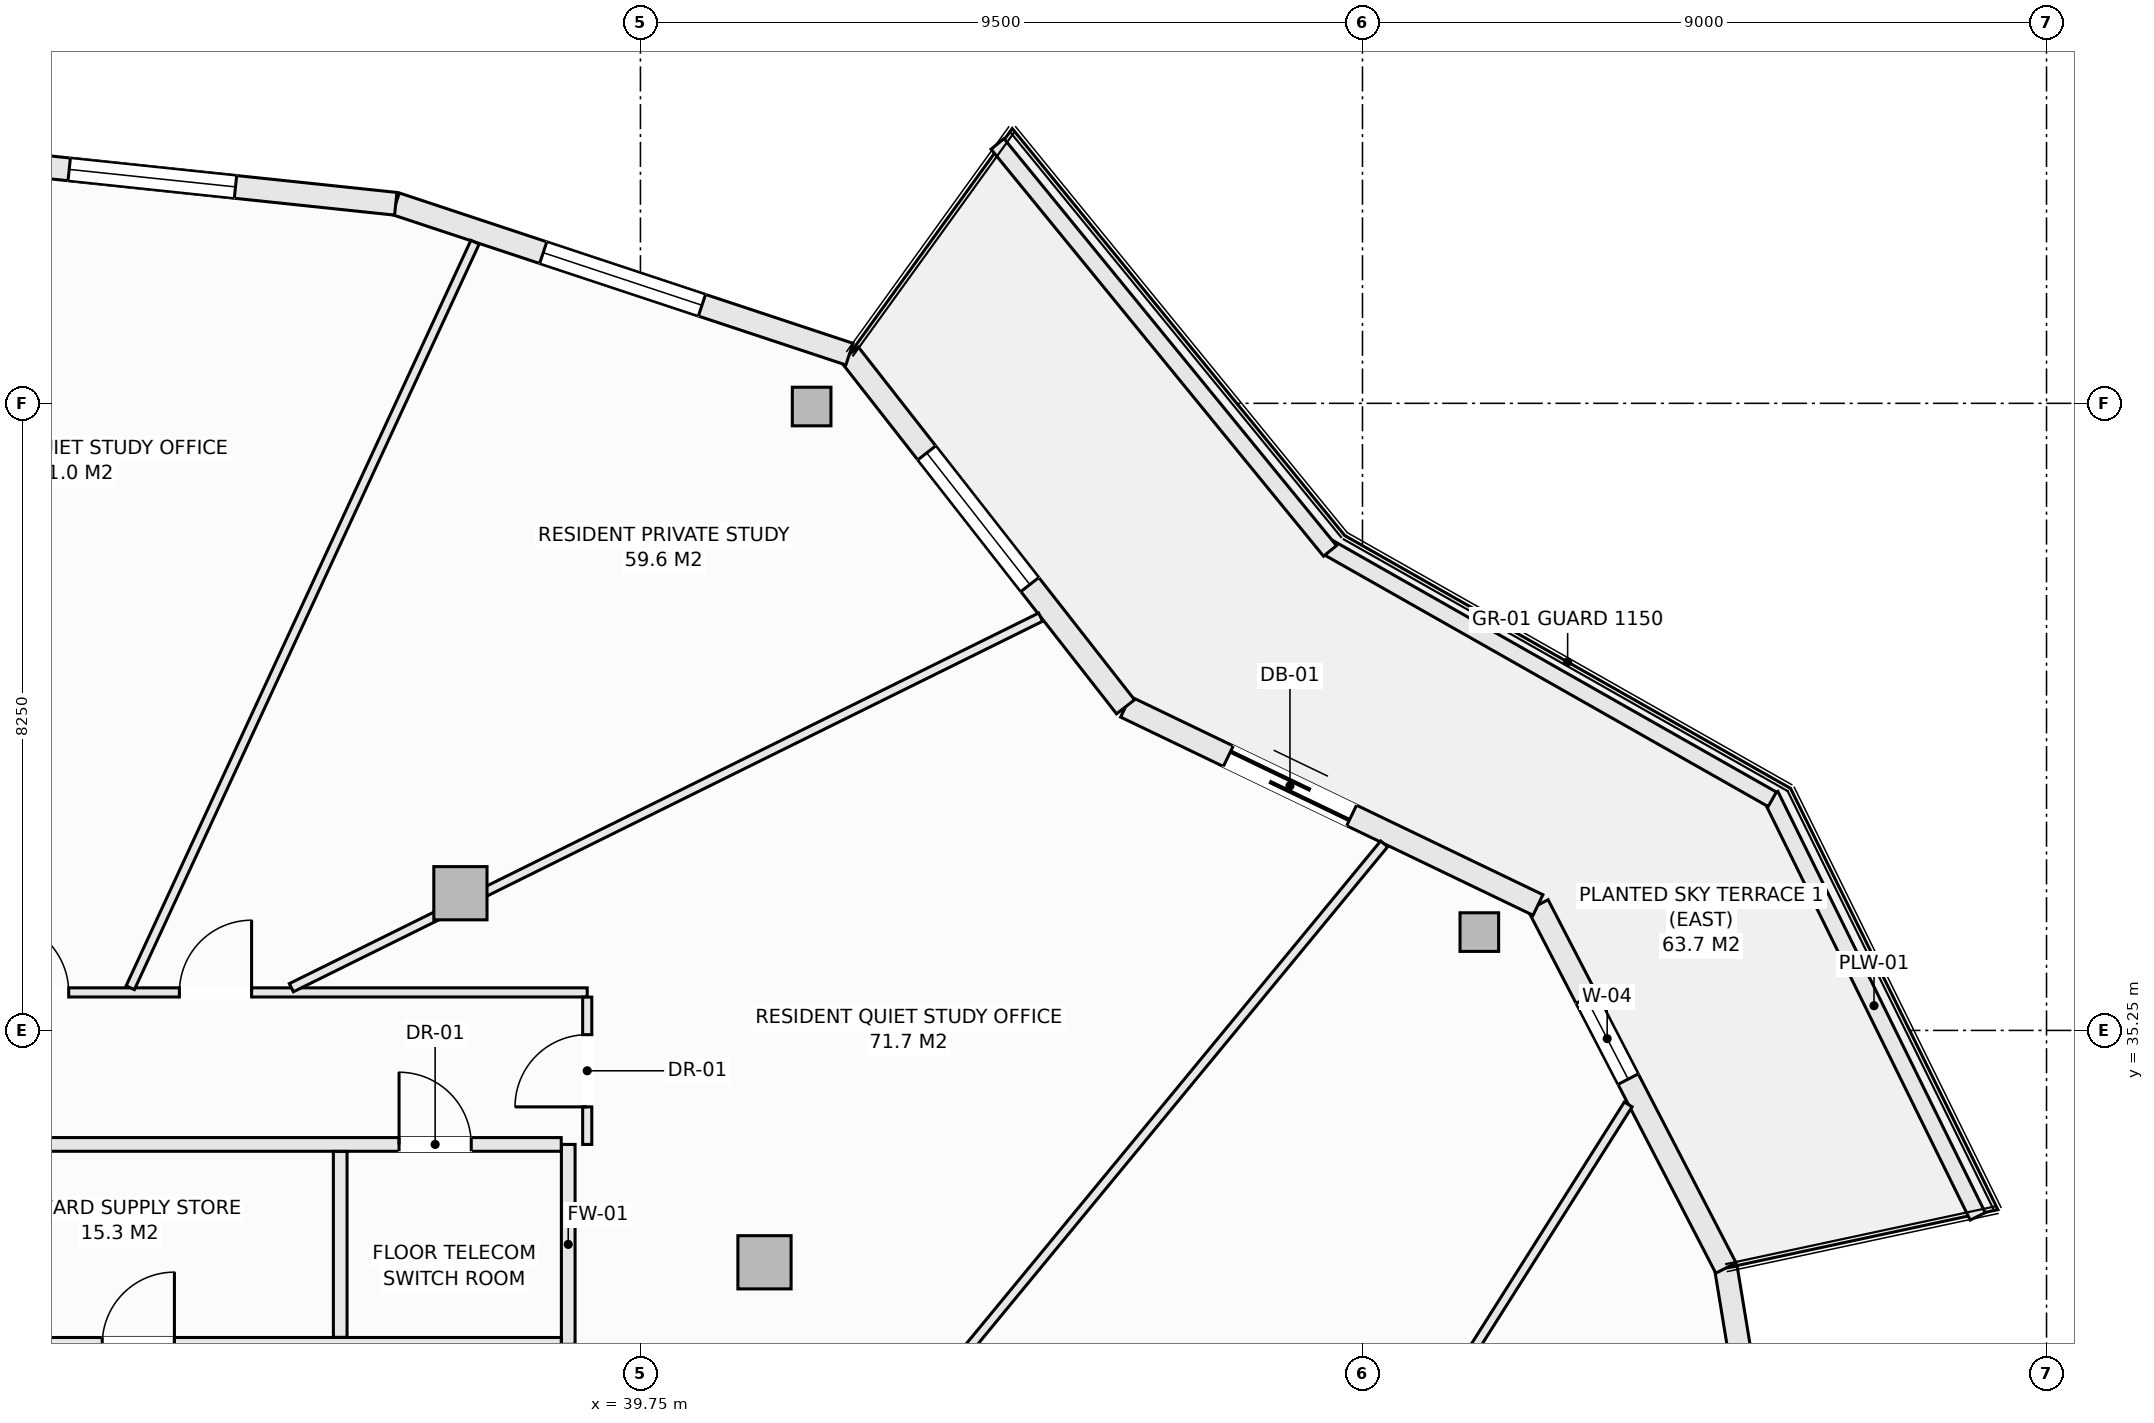
"""IFC4 building model, lengths in metres.
Left out: names, types, materials, properties, quantities, classifications, styles, units other than length and angle.
Written with IfcOpenShell. Run it as: python <this file> out.ifc"""

import sys

from ifc_helpers import new_model, si_unit, direction, frame, frame_2d, origin, origin_2d, place, context, subcontext, project, spatial, rectangle, hollow_rectangle, extrude, element, fill, save


model = new_model("IFC4")
c1 = context("Model", 3, precision=1e-05, world=origin(), true_north=direction((0.0, 1.0)))
c2 = subcontext(c1, "Body", "Model", "MODEL_VIEW")
j1 = project(units=[si_unit("LENGTHUNIT", "METRE"), si_unit("PLANEANGLEUNIT", "RADIAN")], contexts=[c1])
p1 = place(None, origin())
s1 = spatial("IfcSite", under=j1, at=p1, CompositionType="ELEMENT")
p2 = place(p1, origin())
s2 = spatial("IfcBuilding", under=s1, at=p2, CompositionType="ELEMENT")
p3 = place(p2, frame((0.0, 0.0, 203.0)))
s3 = spatial("IfcBuildingStorey", under=s2, at=p3, CompositionType="ELEMENT", Elevation=203.0)
for number, where, z_axis, x_axis in (
    (1, (50.787, 36.544, -0.27), (0.0, 0.0, 1.0), (1.0, 0.0, 0.0)),
    (2, (42.003, 43.458, -0.27), (0.0, 0.0, 1.0), (1.0, 0.0, 0.0)),
):
    element("IfcColumn", number, at=place(p3, frame(where, z_axis=z_axis, x_axis=x_axis)), inside=s3, PredefinedType="COLUMN", context=c2, shape_type="SweptSolid", body=[
        extrude(hollow_rectangle(XDim=0.508, YDim=0.508, WallThickness=0.019, at=origin_2d()), origin(), (0.0, 0.0, 1.0), 3.3),
    ])
for number, where, z_axis, x_axis in (
    (3, (41.382, 32.199, -0.27), (0.0, 0.0, 1.0), (1.0, 0.0, 0.0)),
    (4, (37.382, 37.055, -0.27), (0.0, 0.0, 1.0), (1.0, 0.0, 0.0)),
):
    element("IfcColumn", number, at=place(p3, frame(where, z_axis=z_axis, x_axis=x_axis)), inside=s3, PredefinedType="COLUMN", context=c2, shape_type="SweptSolid", body=[
        extrude(rectangle(XDim=0.7, YDim=0.7, at=origin_2d()), origin(), (0.0, 0.0, 1.0), 3.3),
    ])
p4 = place(p3, frame((54.032, 32.125, 0.0), z_axis=(0.0, 0.0, 1.0), x_axis=(0.16237087798, -0.986729799886, 0.0)))
e5 = element("IfcWall", 5, at=p4, inside=s3, PredefinedType="SOLIDWALL", context=c2, shape_type="SweptSolid", body=[
    extrude(rectangle(XDim=5.193, YDim=0.3, at=frame_2d((2.597, 0.0))), origin(), (0.0, 0.0, 1.0), 2.605),
])
p5 = place(p4, frame((1.497, 0.0, 0.72)))
e6 = element("IfcOpeningElement", 6, at=p5, cuts=e5, PredefinedType="OPENING", context=c2, shape_type="SweptSolid", body=[
    extrude(rectangle(XDim=2.2, YDim=1.65, at=frame_2d((1.1, 0.825))), frame((0.0, 0.16, 0.0), z_axis=(0.0, -1.0, 0.0), x_axis=(1.0, 0.0, 0.0)), (0.0, 0.0, 1.0), 0.32),
])
p6 = place(p3, frame((51.559, 36.9, 0.0), z_axis=(0.0, 0.0, 1.0), x_axis=(0.459808219482, -0.888018243786, 0.0)))
e7 = element("IfcWall", 7, at=p6, inside=s3, PredefinedType="SOLIDWALL", context=c2, shape_type="SweptSolid", body=[
    extrude(rectangle(XDim=5.378, YDim=0.3, at=frame_2d((2.689, 0.0))), origin(), (0.0, 0.0, 1.0), 2.605),
])
p7 = place(p6, frame((1.38, 0.0, 0.72)))
e8 = element("IfcOpeningElement", 8, at=p7, cuts=e7, PredefinedType="OPENING", context=c2, shape_type="SweptSolid", body=[
    extrude(rectangle(XDim=1.2, YDim=1.65, at=frame_2d((0.6, 0.825))), frame((0.0, 0.16, 0.0), z_axis=(0.0, -1.0, 0.0), x_axis=(1.0, 0.0, 0.0)), (0.0, 0.0, 1.0), 0.32),
])
p8 = place(p3, frame((46.133, 39.507, 0.0), z_axis=(0.0, 0.0, 1.0), x_axis=(0.901348331142, -0.433094892545, 0.0)))
e9 = element("IfcWall", 9, at=p8, inside=s3, PredefinedType="SOLIDWALL", context=c2, shape_type="SweptSolid", body=[
    extrude(rectangle(XDim=6.021, YDim=0.3, at=frame_2d((3.01, 0.0))), origin(), (0.0, 0.0, 1.0), 2.605),
])
p9 = place(p8, frame((1.5, 0.0, 0.0)))
e10 = element("IfcOpeningElement", 10, at=p9, cuts=e9, PredefinedType="OPENING", context=c2, shape_type="SweptSolid", body=[
    extrude(rectangle(XDim=1.8, YDim=2.25, at=frame_2d((0.9, 1.125))), frame((0.0, 0.16, 0.0), z_axis=(0.0, -1.0, 0.0), x_axis=(1.0, 0.0, 0.0)), (0.0, 0.0, 1.0), 0.32),
])
p10 = place(p3, frame((42.5, 44.147, 0.0), z_axis=(0.0, 0.0, 1.0), x_axis=(0.616450126935, -0.787393955401, 0.0)))
e11 = element("IfcWall", 11, at=p10, inside=s3, PredefinedType="SOLIDWALL", context=c2, shape_type="SweptSolid", body=[
    extrude(rectangle(XDim=5.893, YDim=0.3, at=frame_2d((2.946, 0.0))), origin(), (0.0, 0.0, 1.0), 2.605),
])
p11 = place(p10, frame((1.65, 0.0, 0.72)))
e12 = element("IfcOpeningElement", 12, at=p11, cuts=e11, PredefinedType="OPENING", context=c2, shape_type="SweptSolid", body=[
    extrude(rectangle(XDim=2.2, YDim=1.65, at=frame_2d((1.1, 0.825))), frame((0.0, 0.16, 0.0), z_axis=(0.0, -1.0, 0.0), x_axis=(1.0, 0.0, 0.0)), (0.0, 0.0, 1.0), 0.32),
])
p12 = place(p3, frame((36.531, 46.125, 0.0), z_axis=(0.0, 0.0, 1.0), x_axis=(0.949240877604, -0.314550085495, 0.0)))
e13 = element("IfcWall", 13, at=p12, inside=s3, PredefinedType="SOLIDWALL", context=c2, shape_type="SweptSolid", body=[
    extrude(rectangle(XDim=6.288, YDim=0.3, at=frame_2d((3.144, 0.0))), origin(), (0.0, 0.0, 1.0), 2.605),
])
p13 = place(p12, frame((2.044, 0.0, 0.72)))
e14 = element("IfcOpeningElement", 14, at=p13, cuts=e13, PredefinedType="OPENING", context=c2, shape_type="SweptSolid", body=[
    extrude(rectangle(XDim=2.2, YDim=1.65, at=frame_2d((1.1, 0.825))), frame((0.0, 0.16, 0.0), z_axis=(0.0, -1.0, 0.0), x_axis=(1.0, 0.0, 0.0)), (0.0, 0.0, 1.0), 0.32),
])
p14 = place(p3, frame((30.125, 46.8, 0.0), z_axis=(0.0, 0.0, 1.0), x_axis=(0.994497142298, -0.104763705363, 0.0)))
e15 = element("IfcWall", 15, at=p14, inside=s3, PredefinedType="SOLIDWALL", context=c2, shape_type="SweptSolid", body=[
    extrude(rectangle(XDim=6.441, YDim=0.3, at=frame_2d((3.221, 0.0))), origin(), (0.0, 0.0, 1.0), 2.605),
])
p15 = place(p14, frame((2.121, 0.0, 0.72)))
e16 = element("IfcOpeningElement", 16, at=p15, cuts=e15, PredefinedType="OPENING", context=c2, shape_type="SweptSolid", body=[
    extrude(rectangle(XDim=2.2, YDim=1.65, at=frame_2d((1.1, 0.825))), frame((0.0, 0.16, 0.0), z_axis=(0.0, -1.0, 0.0), x_axis=(1.0, 0.0, 0.0)), (0.0, 0.0, 1.0), 0.32),
])
p16 = place(p3, frame((54.616, 38.347, 0.0), z_axis=(0.0, 0.0, 1.0), x_axis=(0.441640961804, -0.897191875162, 0.0)))
e17 = element("IfcWall", 17, at=p16, inside=s3, PredefinedType="PARAPET", context=c2, shape_type="SweptSolid", body=[
    extrude(rectangle(XDim=6.178, YDim=0.22, at=frame_2d((3.089, 0.0))), origin(), (0.0, 0.0, 1.0), 0.52),
])
p17 = place(p3, frame((48.776, 41.617, 0.0), z_axis=(0.0, 0.0, 1.0), x_axis=(0.869860619267, -0.493297580623, 0.0)))
e18 = element("IfcWall", 18, at=p17, inside=s3, PredefinedType="PARAPET", context=c2, shape_type="SweptSolid", body=[
    extrude(rectangle(XDim=6.743, YDim=0.22, at=frame_2d((3.371, 0.0))), origin(), (0.0, 0.0, 1.0), 0.52),
])
p18 = place(p3, frame((44.448, 46.913, 0.0), z_axis=(0.0, 0.0, 1.0), x_axis=(0.632697312147, -0.774399193699, 0.0)))
e19 = element("IfcWall", 19, at=p18, inside=s3, PredefinedType="PARAPET", context=c2, shape_type="SweptSolid", body=[
    extrude(rectangle(XDim=6.914, YDim=0.22, at=frame_2d((3.457, 0.0))), origin(), (0.0, 0.0, 1.0), 0.52),
])
p19 = place(p3, frame((38.8, 31.12, 0.0), z_axis=(0.0, 0.0, 1.0), x_axis=(0.0, 1.0, 0.0)))
e20 = element("IfcWall", 20, at=p19, inside=s3, PredefinedType="SOLIDWALL", context=c2, shape_type="SweptSolid", body=[
    extrude(rectangle(XDim=2.63, YDim=0.18, at=frame_2d((1.315, 0.0))), origin(), (0.0, 0.0, 1.0), 3.03),
])
p20 = place(p3, frame((30.077, 31.12, 0.0), z_axis=(0.0, 0.0, 1.0), x_axis=(1.0, 0.0, 0.0)))
e21 = element("IfcWall", 21, at=p20, inside=s3, PredefinedType="SOLIDWALL", context=c2, shape_type="SweptSolid", body=[
    extrude(rectangle(XDim=8.631, YDim=0.18, at=frame_2d((4.315, 0.0))), origin(), (0.0, 0.0, 1.0), 3.03),
])
p21 = place(p20, frame((2.592, 0.0, 0.0)))
e22 = element("IfcOpeningElement", 22, at=p21, cuts=e21, PredefinedType="OPENING", context=c2, shape_type="SweptSolid", body=[
    extrude(rectangle(XDim=0.95, YDim=2.1, at=frame_2d((0.475, 1.05))), frame((0.0, 0.1, 0.0), z_axis=(0.0, -1.0, 0.0), x_axis=(1.0, 0.0, 0.0)), (0.0, 0.0, 1.0), 0.2),
])
p22 = place(p3, frame((30.077, 33.75, 0.0), z_axis=(0.0, 0.0, 1.0), x_axis=(1.0, 0.0, 0.0)))
e23 = element("IfcWall", 23, at=p22, inside=s3, PredefinedType="SOLIDWALL", context=c2, shape_type="SweptSolid", body=[
    extrude(rectangle(XDim=8.631, YDim=0.18, at=frame_2d((4.315, 0.0))), origin(), (0.0, 0.0, 1.0), 3.03),
])
p23 = place(p22, frame((6.497, 0.0, 0.0)))
e24 = element("IfcOpeningElement", 24, at=p23, cuts=e23, PredefinedType="OPENING", context=c2, shape_type="SweptSolid", body=[
    extrude(rectangle(XDim=0.95, YDim=2.1, at=frame_2d((0.475, 1.05))), frame((0.0, 0.1, 0.0), z_axis=(0.0, -1.0, 0.0), x_axis=(1.0, 0.0, 0.0)), (0.0, 0.0, 1.0), 0.2),
])
p24 = place(p3, frame((35.8, 31.212, 0.0), z_axis=(0.0, 0.0, 1.0), x_axis=(0.0, 1.0, 0.0)))
e25 = element("IfcWall", 25, at=p24, inside=s3, PredefinedType="SOLIDWALL", context=c2, shape_type="SweptSolid", body=[
    extrude(rectangle(XDim=2.446, YDim=0.18, at=frame_2d((1.223, 0.0))), origin(), (0.0, 0.0, 1.0), 3.03),
])
p25 = place(p3, frame((30.062, 35.75, 0.0), z_axis=(0.0, 0.0, 1.0), x_axis=(1.0, 0.0, 0.0)))
e26 = element("IfcWall", 26, at=p25, inside=s3, PredefinedType="PARTITIONING", context=c2, shape_type="SweptSolid", body=[
    extrude(rectangle(XDim=8.988, YDim=0.12, at=frame_2d((4.494, 0.0))), origin(), (0.0, 0.0, 1.0), 2.478),
])
p26 = place(p25, frame((3.622, 0.0, 0.0)))
e27 = element("IfcOpeningElement", 27, at=p26, cuts=e26, PredefinedType="OPENING", context=c2, shape_type="SweptSolid", body=[
    extrude(rectangle(XDim=0.95, YDim=2.1, at=frame_2d((0.475, 1.05))), frame((0.0, 0.07, 0.0), z_axis=(0.0, -1.0, 0.0), x_axis=(1.0, 0.0, 0.0)), (0.0, 0.0, 1.0), 0.14),
])
p27 = place(p25, frame((1.216, 0.0, 0.0)))
e28 = element("IfcOpeningElement", 28, at=p27, cuts=e26, PredefinedType="OPENING", context=c2, shape_type="SweptSolid", body=[
    extrude(rectangle(XDim=0.95, YDim=2.1, at=frame_2d((0.475, 1.05))), frame((0.0, 0.07, 0.0), z_axis=(0.0, -1.0, 0.0), x_axis=(1.0, 0.0, 0.0)), (0.0, 0.0, 1.0), 0.14),
])
p28 = place(p3, frame((39.05, 33.75, 0.0), z_axis=(0.0, 0.0, 1.0), x_axis=(0.0, 1.0, 0.0)))
e29 = element("IfcWall", 29, at=p28, inside=s3, PredefinedType="PARTITIONING", context=c2, shape_type="SweptSolid", body=[
    extrude(rectangle(XDim=1.938, YDim=0.12, at=frame_2d((0.969, 0.0))), origin(), (0.0, 0.0, 1.0), 3.03),
])
p29 = place(p28, frame((0.494, 0.0, 0.0)))
e30 = element("IfcOpeningElement", 30, at=p29, cuts=e29, PredefinedType="OPENING", context=c2, shape_type="SweptSolid", body=[
    extrude(rectangle(XDim=0.95, YDim=2.1, at=frame_2d((0.475, 1.05))), frame((0.0, 0.07, 0.0), z_axis=(0.0, -1.0, 0.0), x_axis=(1.0, 0.0, 0.0)), (0.0, 0.0, 1.0), 0.14),
])
p30 = place(p3, frame((41.582, 16.617, 0.0), z_axis=(0.0, 0.0, 1.0), x_axis=(0.534374121444, 0.845248069108, 0.0)))
e31 = element("IfcWall", 31, at=p30, inside=s3, PredefinedType="PARTITIONING", context=c2, shape_type="SweptSolid", body=[
    extrude(rectangle(XDim=20.892, YDim=0.12, at=frame_2d((10.446, 0.0))), origin(), (0.0, 0.0, 1.0), 3.03),
])
p31 = place(p3, frame((44.01, 31.0, 0.0), z_axis=(0.0, 0.0, 1.0), x_axis=(0.635986973411, 0.771699792439, 0.0)))
e32 = element("IfcWall", 32, at=p31, inside=s3, PredefinedType="PARTITIONING", context=c2, shape_type="SweptSolid", body=[
    extrude(rectangle(XDim=8.687, YDim=0.12, at=frame_2d((4.344, 0.0))), origin(), (0.0, 0.0, 1.0), 2.712),
])
p32 = place(p3, frame((35.157, 35.812, 0.0), z_axis=(0.0, 0.0, 1.0), x_axis=(0.896376577458, 0.443293391992, 0.0)))
e33 = element("IfcWall", 33, at=p32, inside=s3, PredefinedType="PARTITIONING", context=c2, shape_type="SweptSolid", body=[
    extrude(rectangle(XDim=10.998, YDim=0.12, at=frame_2d((5.499, 0.0))), origin(), (0.0, 0.0, 1.0), 2.478),
])
p33 = place(p3, frame((33.038, 35.812, 0.0), z_axis=(0.0, 0.0, 1.0), x_axis=(0.419785881818, 0.907623167083, 0.0)))
e34 = element("IfcWall", 34, at=p33, inside=s3, PredefinedType="PARTITIONING", context=c2, shape_type="SweptSolid", body=[
    extrude(rectangle(XDim=10.806, YDim=0.12, at=frame_2d((5.403, 0.0))), origin(), (0.0, 0.0, 1.0), 3.03),
])
p34 = place(p7, origin())
e35 = element("IfcWindow", 35, at=p34, inside=s3, PartitioningType="SINGLE_PANEL", PredefinedType="WINDOW", context=c2, shape_type="SweptSolid", body=[
    extrude(rectangle(XDim=1.2, YDim=1.65, at=frame_2d((0.6, 0.825))), frame((0.0, 0.03, 0.0), z_axis=(0.0, -1.0, 0.0), x_axis=(1.0, 0.0, 0.0)), (0.0, 0.0, 1.0), 0.06),
])
fill(e8, e35)
p35 = place(p9, origin())
e36 = element("IfcDoor", 36, at=p35, inside=s3, OperationType="SLIDING_TO_LEFT", PredefinedType="DOOR", context=c2, shape_type="SweptSolid", body=[
    extrude(rectangle(XDim=1.8, YDim=2.25, at=frame_2d((0.9, 1.125))), frame((0.0, 0.025, 0.0), z_axis=(0.0, -1.0, 0.0), x_axis=(1.0, 0.0, 0.0)), (0.0, 0.0, 1.0), 0.05),
])
fill(e10, e36)
p36 = place(p11, origin())
e37 = element("IfcWindow", 37, at=p36, inside=s3, PartitioningType="SINGLE_PANEL", PredefinedType="WINDOW", context=c2, shape_type="SweptSolid", body=[
    extrude(rectangle(XDim=2.2, YDim=1.65, at=frame_2d((1.1, 0.825))), frame((0.0, 0.03, 0.0), z_axis=(0.0, -1.0, 0.0), x_axis=(1.0, 0.0, 0.0)), (0.0, 0.0, 1.0), 0.06),
])
fill(e12, e37)
p37 = place(p13, origin())
e38 = element("IfcWindow", 38, at=p37, inside=s3, PartitioningType="SINGLE_PANEL", PredefinedType="WINDOW", context=c2, shape_type="SweptSolid", body=[
    extrude(rectangle(XDim=2.2, YDim=1.65, at=frame_2d((1.1, 0.825))), frame((0.0, 0.03, 0.0), z_axis=(0.0, -1.0, 0.0), x_axis=(1.0, 0.0, 0.0)), (0.0, 0.0, 1.0), 0.06),
])
fill(e14, e38)
p38 = place(p15, origin())
e39 = element("IfcWindow", 39, at=p38, inside=s3, PartitioningType="SINGLE_PANEL", PredefinedType="WINDOW", context=c2, shape_type="SweptSolid", body=[
    extrude(rectangle(XDim=2.2, YDim=1.65, at=frame_2d((1.1, 0.825))), frame((0.0, 0.03, 0.0), z_axis=(0.0, -1.0, 0.0), x_axis=(1.0, 0.0, 0.0)), (0.0, 0.0, 1.0), 0.06),
])
fill(e16, e39)
p39 = place(p21, origin())
e40 = element("IfcDoor", 40, at=p39, inside=s3, OperationType="SINGLE_SWING_RIGHT", PredefinedType="DOOR", context=c2, shape_type="SweptSolid", body=[
    extrude(rectangle(XDim=0.95, YDim=2.1, at=frame_2d((0.475, 1.05))), frame((0.0, 0.025, 0.0), z_axis=(0.0, -1.0, 0.0), x_axis=(1.0, 0.0, 0.0)), (0.0, 0.0, 1.0), 0.05),
])
fill(e22, e40)
p40 = place(p23, origin())
e41 = element("IfcDoor", 41, at=p40, inside=s3, OperationType="SINGLE_SWING_LEFT", PredefinedType="DOOR", context=c2, shape_type="SweptSolid", body=[
    extrude(rectangle(XDim=0.95, YDim=2.1, at=frame_2d((0.475, 1.05))), frame((0.0, 0.025, 0.0), z_axis=(0.0, -1.0, 0.0), x_axis=(1.0, 0.0, 0.0)), (0.0, 0.0, 1.0), 0.05),
])
fill(e24, e41)
p41 = place(p29, origin())
e42 = element("IfcDoor", 42, at=p41, inside=s3, OperationType="SINGLE_SWING_LEFT", PredefinedType="DOOR", context=c2, shape_type="SweptSolid", body=[
    extrude(rectangle(XDim=0.95, YDim=2.1, at=frame_2d((0.475, 1.05))), frame((0.0, 0.025, 0.0), z_axis=(0.0, -1.0, 0.0), x_axis=(1.0, 0.0, 0.0)), (0.0, 0.0, 1.0), 0.05),
])
fill(e30, e42)
p42 = place(p26, origin())
e43 = element("IfcDoor", 43, at=p42, inside=s3, OperationType="SINGLE_SWING_RIGHT", PredefinedType="DOOR", context=c2, shape_type="SweptSolid", body=[
    extrude(rectangle(XDim=0.95, YDim=2.1, at=frame_2d((0.475, 1.05))), frame((0.0, 0.025, 0.0), z_axis=(0.0, -1.0, 0.0), x_axis=(1.0, 0.0, 0.0)), (0.0, 0.0, 1.0), 0.05),
])
fill(e27, e43)
p43 = place(p27, origin())
e44 = element("IfcDoor", 44, at=p43, inside=s3, OperationType="SINGLE_SWING_LEFT", PredefinedType="DOOR", context=c2, shape_type="SweptSolid", body=[
    extrude(rectangle(XDim=0.95, YDim=2.1, at=frame_2d((0.475, 1.05))), frame((0.0, 0.025, 0.0), z_axis=(0.0, -1.0, 0.0), x_axis=(1.0, 0.0, 0.0)), (0.0, 0.0, 1.0), 0.05),
])
fill(e28, e44)
save(model, sys.argv[1])
